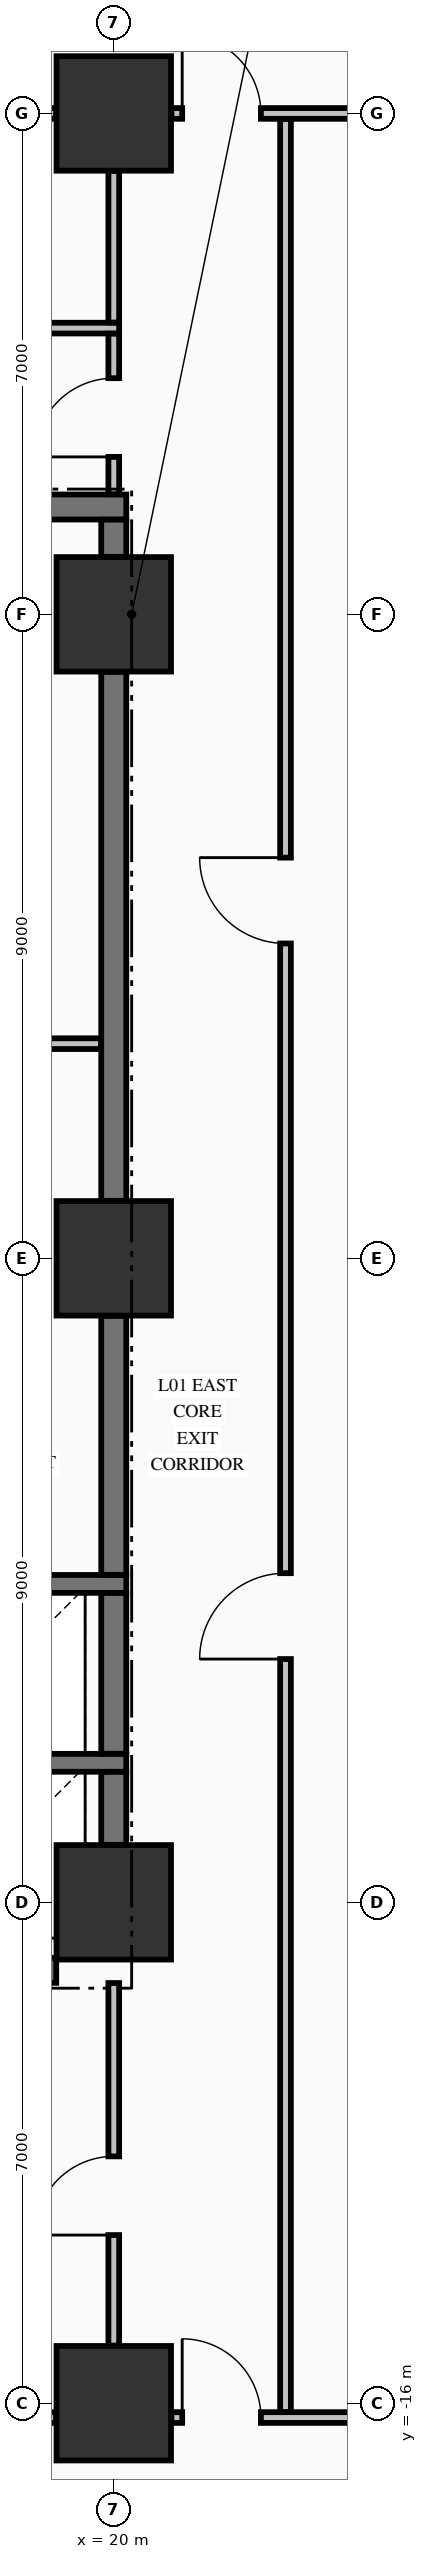
"""IFC4 building model, lengths in metres.
Left out: names, types, materials, properties, quantities, classifications, styles, units other than length and angle.
Written with IfcOpenShell. Run it as: python <this file> out.ifc"""

import sys

from ifc_helpers import new_model, si_unit, direction, frame, frame_2d, origin, origin_2d, place, context, subcontext, project, spatial, rectangle, extrude, element, fill, save


model = new_model("IFC4")
c1 = context("Model", 3, precision=1e-05, world=origin(), true_north=direction((0.0, 1.0)))
c2 = subcontext(c1, "Body", "Model", "MODEL_VIEW")
j1 = project(units=[si_unit("LENGTHUNIT", "METRE"), si_unit("PLANEANGLEUNIT", "RADIAN")], contexts=[c1])
p1 = place(None, origin())
s1 = spatial("IfcSite", under=j1, at=p1, CompositionType="ELEMENT")
p2 = place(p1, origin())
s2 = spatial("IfcBuilding", under=s1, at=p2, CompositionType="ELEMENT")
p3 = place(p2, frame((0.0, 0.0, 5.44)))
s3 = spatial("IfcBuildingStorey", under=s2, at=p3, CompositionType="ELEMENT", Elevation=5.44)
for number, where, z_axis, x_axis in (
    (1, (20.0, -16.0, 0.0), (0.0, 0.0, 1.0), (1.0, 0.0, 0.0)),
    (2, (20.0, -9.0, 0.0), (0.0, 0.0, 1.0), (1.0, 0.0, 0.0)),
    (3, (20.0, 0.0, 0.0), (0.0, 0.0, 1.0), (1.0, 0.0, 0.0)),
    (4, (20.0, 9.0, 0.0), (0.0, 0.0, 1.0), (1.0, 0.0, 0.0)),
    (5, (20.0, 16.0, 0.0), (0.0, 0.0, 1.0), (1.0, 0.0, 0.0)),
):
    element("IfcColumn", number, at=place(p3, frame(where, z_axis=z_axis, x_axis=x_axis)), inside=s3, PredefinedType="COLUMN", context=c2, shape_type="SweptSolid", body=[
        extrude(rectangle(XDim=1.6, YDim=1.6, at=origin_2d()), origin(), (0.0, 0.0, 1.0), 5.09),
    ])
p4 = place(p3, frame((14.7, -9.95, 0.0), z_axis=(0.0, 0.0, 1.0), x_axis=(1.0, 0.0, 0.0)))
e6 = element("IfcWall", 6, at=p4, inside=s3, PredefinedType="SHEAR", context=c2, shape_type="SweptSolid", body=[
    extrude(rectangle(XDim=4.496, YDim=0.35, at=frame_2d((2.248, 0.0))), origin(), (0.0, 0.0, 1.0), 5.09),
])
p5 = place(p4, frame((0.8, 0.0, 0.0)))
e7 = element("IfcOpeningElement", 7, at=p5, cuts=e6, PredefinedType="OPENING", context=c2, shape_type="SweptSolid", body=[
    extrude(rectangle(XDim=0.9, YDim=2.15, at=frame_2d((0.45, 1.075))), frame((0.0, 0.185, 0.0), z_axis=(0.0, -1.0, 0.0), x_axis=(1.0, 0.0, 0.0)), (0.0, 0.0, 1.0), 0.37),
])
for number, where, z_axis, x_axis in (
    (8, (17.025, -7.05, 0.0), (0.0, 0.0, 1.0), (1.0, 0.0, 0.0)),
    (9, (17.025, -4.55, 0.0), (0.0, 0.0, 1.0), (1.0, 0.0, 0.0)),
):
    element("IfcWall", number, at=place(p3, frame(where, z_axis=z_axis, x_axis=x_axis)), inside=s3, PredefinedType="SOLIDWALL", context=c2, shape_type="SweptSolid", body=[
        extrude(rectangle(XDim=3.15, YDim=0.25, at=frame_2d((1.575, 0.0))), origin(), (0.0, 0.0, 1.0), 5.09),
    ])
p6 = place(p3, frame((14.7, 10.5, 0.0), z_axis=(0.0, 0.0, 1.0), x_axis=(1.0, 0.0, 0.0)))
e10 = element("IfcWall", 10, at=p6, inside=s3, PredefinedType="SHEAR", context=c2, shape_type="SweptSolid", body=[
    extrude(rectangle(XDim=5.475, YDim=0.35, at=frame_2d((2.738, 0.0))), origin(), (0.0, 0.0, 1.0), 5.09),
])
p7 = place(p6, frame((0.63, 0.0, 0.0)))
e11 = element("IfcOpeningElement", 11, at=p7, cuts=e10, PredefinedType="OPENING", context=c2, shape_type="SweptSolid", body=[
    extrude(rectangle(XDim=0.9, YDim=2.15, at=frame_2d((0.45, 1.075))), frame((0.0, 0.185, 0.0), z_axis=(0.0, -1.0, 0.0), x_axis=(1.0, 0.0, 0.0)), (0.0, 0.0, 1.0), 0.37),
])
p8 = place(p6, frame((3.27, 0.0, 0.0)))
e12 = element("IfcOpeningElement", 12, at=p8, cuts=e10, PredefinedType="OPENING", context=c2, shape_type="SweptSolid", body=[
    extrude(rectangle(XDim=0.9, YDim=2.15, at=frame_2d((0.45, 1.075))), frame((0.0, 0.185, 0.0), z_axis=(0.0, -1.0, 0.0), x_axis=(1.0, 0.0, 0.0)), (0.0, 0.0, 1.0), 0.37),
])
p9 = place(p3, frame((11.806, -16.2, 0.0), z_axis=(0.0, 0.0, 1.0), x_axis=(1.0, 0.0, 0.0)))
e13 = element("IfcWall", 13, at=p9, inside=s3, PredefinedType="PARTITIONING", context=c2, shape_type="SweptSolid", body=[
    extrude(rectangle(XDim=7.388, YDim=0.15, at=frame_2d((3.694, 0.0))), origin(), (0.0, 0.0, 1.0), 4.132),
])
p10 = place(p9, frame((3.094, 0.0, 0.0)))
e14 = element("IfcOpeningElement", 14, at=p10, cuts=e13, PredefinedType="OPENING", context=c2, shape_type="SweptSolid", body=[
    extrude(rectangle(XDim=1.2, YDim=2.15, at=frame_2d((0.6, 1.075))), frame((0.0, 0.085, 0.0), z_axis=(0.0, -1.0, 0.0), x_axis=(1.0, 0.0, 0.0)), (0.0, 0.0, 1.0), 0.17),
])
p11 = place(p3, frame((20.806, -16.2, 0.0), z_axis=(0.0, 0.0, 1.0), x_axis=(1.0, 0.0, 0.0)))
e15 = element("IfcWall", 15, at=p11, inside=s3, PredefinedType="PARTITIONING", context=c2, shape_type="SweptSolid", body=[
    extrude(rectangle(XDim=4.488, YDim=0.15, at=frame_2d((2.244, 0.0))), origin(), (0.0, 0.0, 1.0), 4.132),
])
p12 = place(p11, frame((0.15, 0.0, 0.0)))
e16 = element("IfcOpeningElement", 16, at=p12, cuts=e15, PredefinedType="OPENING", context=c2, shape_type="SweptSolid", body=[
    extrude(rectangle(XDim=1.1, YDim=2.15, at=frame_2d((0.55, 1.075))), frame((0.0, 0.085, 0.0), z_axis=(0.0, -1.0, 0.0), x_axis=(1.0, 0.0, 0.0)), (0.0, 0.0, 1.0), 0.17),
])
p13 = place(p11, frame((2.844, 0.0, 0.0)))
e17 = element("IfcOpeningElement", 17, at=p13, cuts=e15, PredefinedType="OPENING", context=c2, shape_type="SweptSolid", body=[
    extrude(rectangle(XDim=1.1, YDim=2.15, at=frame_2d((0.55, 1.075))), frame((0.0, 0.085, 0.0), z_axis=(0.0, -1.0, 0.0), x_axis=(1.0, 0.0, 0.0)), (0.0, 0.0, 1.0), 0.17),
])
p14 = place(p3, frame((16.775, 3.0, 0.0), z_axis=(0.0, 0.0, 1.0), x_axis=(1.0, 0.0, 0.0)))
e18 = element("IfcWall", 18, at=p14, inside=s3, PredefinedType="PARTITIONING", context=c2, shape_type="SweptSolid", body=[
    extrude(rectangle(XDim=3.047, YDim=0.15, at=frame_2d((1.523, 0.0))), origin(), (0.0, 0.0, 1.0), 5.09),
])
p15 = place(p14, frame((1.17, 0.0, 0.0)))
e19 = element("IfcOpeningElement", 19, at=p15, cuts=e18, PredefinedType="OPENING", context=c2, shape_type="SweptSolid", body=[
    extrude(rectangle(XDim=0.95, YDim=2.15, at=frame_2d((0.475, 1.075))), frame((0.0, 0.085, 0.0), z_axis=(0.0, -1.0, 0.0), x_axis=(1.0, 0.0, 0.0)), (0.0, 0.0, 1.0), 0.17),
])
p16 = place(p3, frame((8.66, 13.0, 0.0), z_axis=(0.0, 0.0, 1.0), x_axis=(1.0, 0.0, 0.0)))
e20 = element("IfcWall", 20, at=p16, inside=s3, PredefinedType="PARTITIONING", context=c2, shape_type="SweptSolid", body=[
    extrude(rectangle(XDim=11.415, YDim=0.15, at=frame_2d((5.708, 0.0))), origin(), (0.0, 0.0, 1.0), 5.09),
])
p17 = place(p16, frame((0.59, 0.0, 0.0)))
e21 = element("IfcOpeningElement", 21, at=p17, cuts=e20, PredefinedType="OPENING", context=c2, shape_type="SweptSolid", body=[
    extrude(rectangle(XDim=1.1, YDim=2.15, at=frame_2d((0.55, 1.075))), frame((0.0, 0.085, 0.0), z_axis=(0.0, -1.0, 0.0), x_axis=(1.0, 0.0, 0.0)), (0.0, 0.0, 1.0), 0.17),
])
p18 = place(p3, frame((11.806, 16.0, 0.0), z_axis=(0.0, 0.0, 1.0), x_axis=(1.0, 0.0, 0.0)))
e22 = element("IfcWall", 22, at=p18, inside=s3, PredefinedType="PARTITIONING", context=c2, shape_type="SweptSolid", body=[
    extrude(rectangle(XDim=7.388, YDim=0.15, at=frame_2d((3.694, 0.0))), origin(), (0.0, 0.0, 1.0), 4.132),
])
p19 = place(p18, frame((3.144, 0.0, 0.0)))
e23 = element("IfcOpeningElement", 23, at=p19, cuts=e22, PredefinedType="OPENING", context=c2, shape_type="SweptSolid", body=[
    extrude(rectangle(XDim=1.1, YDim=2.15, at=frame_2d((0.55, 1.075))), frame((0.0, 0.085, 0.0), z_axis=(0.0, -1.0, 0.0), x_axis=(1.0, 0.0, 0.0)), (0.0, 0.0, 1.0), 0.17),
])
p20 = place(p3, frame((20.806, 16.0, 0.0), z_axis=(0.0, 0.0, 1.0), x_axis=(1.0, 0.0, 0.0)))
e24 = element("IfcWall", 24, at=p20, inside=s3, PredefinedType="PARTITIONING", context=c2, shape_type="SweptSolid", body=[
    extrude(rectangle(XDim=4.488, YDim=0.15, at=frame_2d((2.244, 0.0))), origin(), (0.0, 0.0, 1.0), 4.132),
])
p21 = place(p20, frame((0.15, 0.0, 0.0)))
e25 = element("IfcOpeningElement", 25, at=p21, cuts=e24, PredefinedType="OPENING", context=c2, shape_type="SweptSolid", body=[
    extrude(rectangle(XDim=1.1, YDim=2.15, at=frame_2d((0.55, 1.075))), frame((0.0, 0.085, 0.0), z_axis=(0.0, -1.0, 0.0), x_axis=(1.0, 0.0, 0.0)), (0.0, 0.0, 1.0), 0.17),
])
p22 = place(p20, frame((2.844, 0.0, 0.0)))
e26 = element("IfcOpeningElement", 26, at=p22, cuts=e24, PredefinedType="OPENING", context=c2, shape_type="SweptSolid", body=[
    extrude(rectangle(XDim=1.1, YDim=2.15, at=frame_2d((0.55, 1.075))), frame((0.0, 0.085, 0.0), z_axis=(0.0, -1.0, 0.0), x_axis=(1.0, 0.0, 0.0)), (0.0, 0.0, 1.0), 0.17),
])
p23 = place(p3, frame((20.0, -8.196, 0.0), z_axis=(0.0, 0.0, 1.0), x_axis=(0.0, 1.0, 0.0)))
e27 = element("IfcWall", 27, at=p23, inside=s3, PredefinedType="SHEAR", context=c2, shape_type="SweptSolid", body=[
    extrude(rectangle(XDim=1.019, YDim=0.35, at=frame_2d((0.51, 0.0))), origin(), (0.0, 0.0, 1.0), 5.09),
])
p24 = place(p3, frame((20.0, -6.923, 0.0), z_axis=(0.0, 0.0, 1.0), x_axis=(0.0, 1.0, 0.0)))
e28 = element("IfcWall", 28, at=p24, inside=s3, PredefinedType="SHEAR", context=c2, shape_type="SweptSolid", body=[
    extrude(rectangle(XDim=2.246, YDim=0.35, at=frame_2d((1.123, 0.0))), origin(), (0.0, 0.0, 1.0), 5.09),
])
p25 = place(p3, frame((20.0, -4.423, 0.0), z_axis=(0.0, 0.0, 1.0), x_axis=(0.0, 1.0, 0.0)))
e29 = element("IfcWall", 29, at=p25, inside=s3, PredefinedType="SHEAR", context=c2, shape_type="SweptSolid", body=[
    extrude(rectangle(XDim=3.619, YDim=0.35, at=frame_2d((1.81, 0.0))), origin(), (0.0, 0.0, 1.0), 5.09),
])
p26 = place(p3, frame((20.0, 0.804, 0.0), z_axis=(0.0, 0.0, 1.0), x_axis=(0.0, 1.0, 0.0)))
e30 = element("IfcWall", 30, at=p26, inside=s3, PredefinedType="SHEAR", context=c2, shape_type="SweptSolid", body=[
    extrude(rectangle(XDim=7.392, YDim=0.35, at=frame_2d((3.696, 0.0))), origin(), (0.0, 0.0, 1.0), 5.09),
])
p27 = place(p3, frame((20.0, 9.804, 0.0), z_axis=(0.0, 0.0, 1.0), x_axis=(0.0, 1.0, 0.0)))
e31 = element("IfcWall", 31, at=p27, inside=s3, PredefinedType="SHEAR", context=c2, shape_type="SweptSolid", body=[
    extrude(rectangle(XDim=0.519, YDim=0.35, at=frame_2d((0.26, 0.0))), origin(), (0.0, 0.0, 1.0), 5.09),
])
p28 = place(p3, frame((20.0, -15.194, 0.0), z_axis=(0.0, 0.0, 1.0), x_axis=(0.0, 1.0, 0.0)))
e32 = element("IfcWall", 32, at=p28, inside=s3, PredefinedType="PARTITIONING", context=c2, shape_type="SweptSolid", body=[
    extrude(rectangle(XDim=5.066, YDim=0.15, at=frame_2d((2.533, 0.0))), origin(), (0.0, 0.0, 1.0), 4.132),
])
p29 = place(p28, frame((1.544, 0.0, 0.0)))
e33 = element("IfcOpeningElement", 33, at=p29, cuts=e32, PredefinedType="OPENING", context=c2, shape_type="SweptSolid", body=[
    extrude(rectangle(XDim=1.1, YDim=2.15, at=frame_2d((0.55, 1.075))), frame((0.0, 0.085, 0.0), z_axis=(0.0, -1.0, 0.0), x_axis=(1.0, 0.0, 0.0)), (0.0, 0.0, 1.0), 0.17),
])
p30 = place(p3, frame((20.0, 10.678, 0.0), z_axis=(0.0, 0.0, 1.0), x_axis=(0.0, 1.0, 0.0)))
e34 = element("IfcWall", 34, at=p30, inside=s3, PredefinedType="PARTITIONING", context=c2, shape_type="SweptSolid", body=[
    extrude(rectangle(XDim=2.244, YDim=0.15, at=frame_2d((1.122, 0.0))), origin(), (0.0, 0.0, 1.0), 4.132),
])
p31 = place(p30, frame((0.522, 0.0, 0.0)))
e35 = element("IfcOpeningElement", 35, at=p31, cuts=e34, PredefinedType="OPENING", context=c2, shape_type="SweptSolid", body=[
    extrude(rectangle(XDim=1.1, YDim=2.15, at=frame_2d((0.55, 1.075))), frame((0.0, 0.085, 0.0), z_axis=(0.0, -1.0, 0.0), x_axis=(1.0, 0.0, 0.0)), (0.0, 0.0, 1.0), 0.17),
])
p32 = place(p3, frame((20.0, 13.078, 0.0), z_axis=(0.0, 0.0, 1.0), x_axis=(0.0, 1.0, 0.0)))
e36 = element("IfcWall", 36, at=p32, inside=s3, PredefinedType="PARTITIONING", context=c2, shape_type="SweptSolid", body=[
    extrude(rectangle(XDim=2.116, YDim=0.15, at=frame_2d((1.058, 0.0))), origin(), (0.0, 0.0, 1.0), 4.132),
])
p33 = place(p3, frame((22.4, -16.122, 0.0), z_axis=(0.0, 0.0, 1.0), x_axis=(0.0, 1.0, 0.0)))
e37 = element("IfcWall", 37, at=p33, inside=s3, PredefinedType="PARTITIONING", context=c2, shape_type="SweptSolid", body=[
    extrude(rectangle(XDim=32.044, YDim=0.15, at=frame_2d((16.022, 0.0))), origin(), (0.0, 0.0, 1.0), 5.09),
])
p34 = place(p33, frame((10.522, 0.0, 0.0)))
e38 = element("IfcOpeningElement", 38, at=p34, cuts=e37, PredefinedType="OPENING", context=c2, shape_type="SweptSolid", body=[
    extrude(rectangle(XDim=1.2, YDim=2.15, at=frame_2d((0.6, 1.075))), frame((0.0, 0.085, 0.0), z_axis=(0.0, -1.0, 0.0), x_axis=(1.0, 0.0, 0.0)), (0.0, 0.0, 1.0), 0.17),
])
p35 = place(p33, frame((20.522, 0.0, 0.0)))
e39 = element("IfcOpeningElement", 39, at=p35, cuts=e37, PredefinedType="OPENING", context=c2, shape_type="SweptSolid", body=[
    extrude(rectangle(XDim=1.2, YDim=2.15, at=frame_2d((0.6, 1.075))), frame((0.0, 0.085, 0.0), z_axis=(0.0, -1.0, 0.0), x_axis=(1.0, 0.0, 0.0)), (0.0, 0.0, 1.0), 0.17),
])
p36 = place(p21, origin())
e40 = element("IfcDoor", 40, at=p36, inside=s3, OperationType="SINGLE_SWING_LEFT", PredefinedType="DOOR", context=c2, shape_type="SweptSolid", body=[
    extrude(rectangle(XDim=1.1, YDim=2.15, at=frame_2d((0.55, 1.075))), frame((0.0, 0.025, 0.0), z_axis=(0.0, -1.0, 0.0), x_axis=(1.0, 0.0, 0.0)), (0.0, 0.0, 1.0), 0.05),
])
fill(e25, e40)
p37 = place(p31, origin())
e41 = element("IfcDoor", 41, at=p37, inside=s3, OperationType="SINGLE_SWING_LEFT", PredefinedType="DOOR", context=c2, shape_type="SweptSolid", body=[
    extrude(rectangle(XDim=1.1, YDim=2.15, at=frame_2d((0.55, 1.075))), frame((0.0, 0.025, 0.0), z_axis=(0.0, -1.0, 0.0), x_axis=(1.0, 0.0, 0.0)), (0.0, 0.0, 1.0), 0.05),
])
fill(e35, e41)
p38 = place(p29, origin())
e42 = element("IfcDoor", 42, at=p38, inside=s3, OperationType="SINGLE_SWING_LEFT", PredefinedType="DOOR", context=c2, shape_type="SweptSolid", body=[
    extrude(rectangle(XDim=1.1, YDim=2.15, at=frame_2d((0.55, 1.075))), frame((0.0, 0.025, 0.0), z_axis=(0.0, -1.0, 0.0), x_axis=(1.0, 0.0, 0.0)), (0.0, 0.0, 1.0), 0.05),
])
fill(e33, e42)
p39 = place(p12, origin())
e43 = element("IfcDoor", 43, at=p39, inside=s3, OperationType="SINGLE_SWING_LEFT", PredefinedType="DOOR", context=c2, shape_type="SweptSolid", body=[
    extrude(rectangle(XDim=1.1, YDim=2.15, at=frame_2d((0.55, 1.075))), frame((0.0, 0.025, 0.0), z_axis=(0.0, -1.0, 0.0), x_axis=(1.0, 0.0, 0.0)), (0.0, 0.0, 1.0), 0.05),
])
fill(e16, e43)
p40 = place(p34, origin())
e44 = element("IfcDoor", 44, at=p40, inside=s3, OperationType="SINGLE_SWING_LEFT", PredefinedType="DOOR", context=c2, shape_type="SweptSolid", body=[
    extrude(rectangle(XDim=1.2, YDim=2.15, at=frame_2d((0.6, 1.075))), frame((0.0, 0.025, 0.0), z_axis=(0.0, -1.0, 0.0), x_axis=(1.0, 0.0, 0.0)), (0.0, 0.0, 1.0), 0.05),
])
fill(e38, e44)
p41 = place(p35, origin())
e45 = element("IfcDoor", 45, at=p41, inside=s3, OperationType="SINGLE_SWING_RIGHT", PredefinedType="DOOR", context=c2, shape_type="SweptSolid", body=[
    extrude(rectangle(XDim=1.2, YDim=2.15, at=frame_2d((0.6, 1.075))), frame((0.0, 0.025, 0.0), z_axis=(0.0, -1.0, 0.0), x_axis=(1.0, 0.0, 0.0)), (0.0, 0.0, 1.0), 0.05),
])
fill(e39, e45)
save(model, sys.argv[1])
